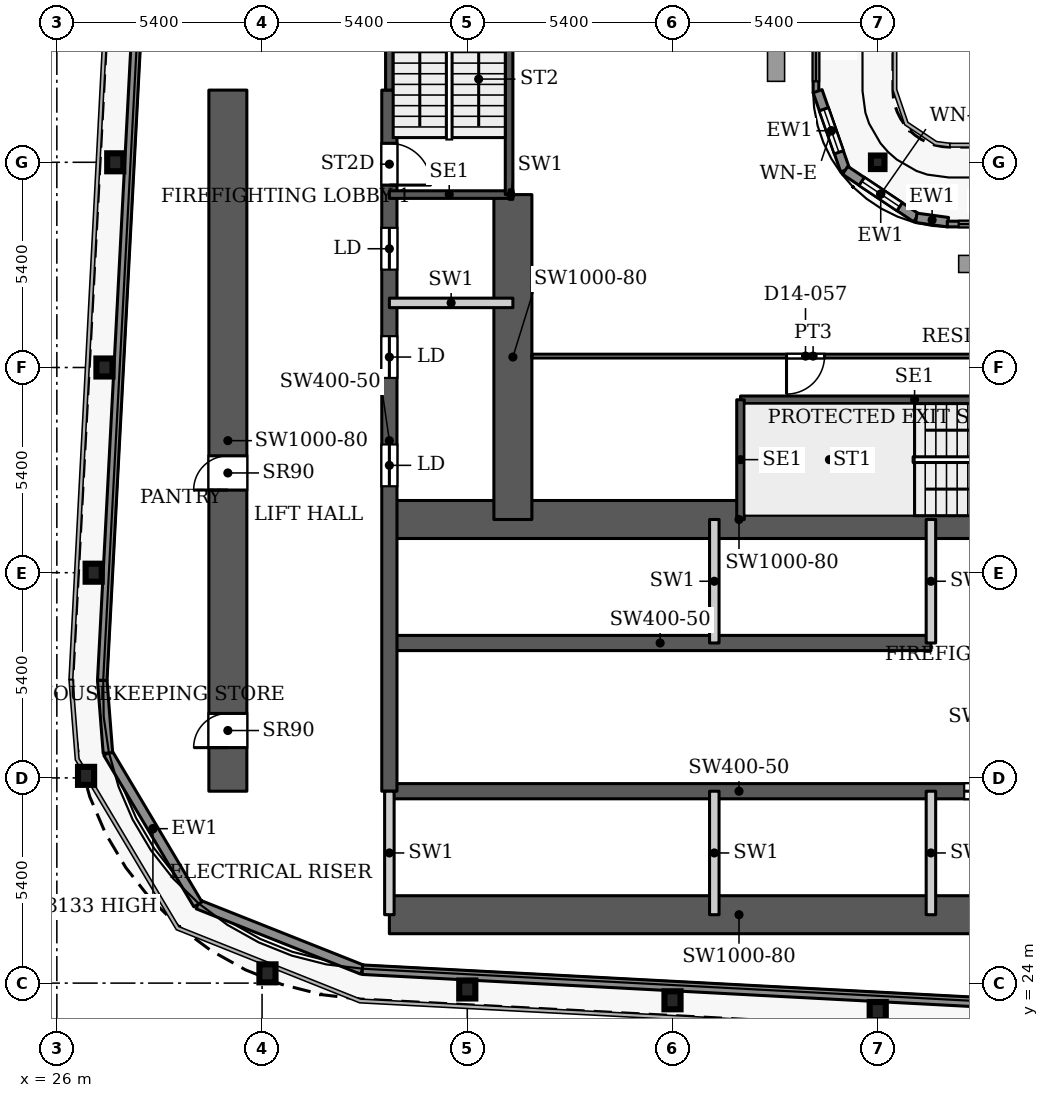
"""IFC4 building model, lengths in metres.
Left out: names, types, materials, properties, quantities, classifications, styles, units other than length and angle.
Written with IfcOpenShell. Run it as: python <this file> out.ifc"""

import sys

from ifc_helpers import new_model, si_unit, direction, frame, frame_2d, origin, origin_2d, place, context, subcontext, project, spatial, rectangle, hollow_rectangle, i_section, extrude, source, transform, mapped, element, fill, save


model = new_model("IFC4")
c1 = context("Model", 3, precision=1e-05, world=origin(), true_north=direction((0.0, 1.0)))
c2 = subcontext(c1, "Body", "Model", "MODEL_VIEW")
j1 = project(units=[si_unit("LENGTHUNIT", "METRE"), si_unit("PLANEANGLEUNIT", "RADIAN")], contexts=[c1])
p1 = place(None, origin())
s1 = spatial("IfcSite", under=j1, at=p1, CompositionType="ELEMENT")
p2 = place(p1, origin())
s2 = spatial("IfcBuilding", under=s1, at=p2, CompositionType="ELEMENT")
p3 = place(p2, frame((0.0, 0.0, 65.6)))
s3 = spatial("IfcBuildingStorey", under=s2, at=p3, CompositionType="ELEMENT", Elevation=65.6)
for number, where, z_axis, x_axis in (
    (1, (47.6, 23.264, 0.0), (0.0, 0.0, 1.0), (1.0, 0.0, 0.0)),
    (2, (42.2, 23.548, 0.0), (0.0, 0.0, 1.0), (1.0, 0.0, 0.0)),
    (3, (36.8, 23.832, 0.0), (0.0, 0.0, 1.0), (1.0, 0.0, 0.0)),
    (4, (31.542, 24.257, 0.0), (0.0, 0.0, 1.0), (1.0, 0.0, 0.0)),
    (5, (26.769, 29.454, 0.0), (0.0, 0.0, 1.0), (1.0, 0.0, 0.0)),
    (6, (26.969, 34.8, 0.0), (0.0, 0.0, 1.0), (1.0, 0.0, 0.0)),
    (7, (27.253, 40.2, 0.0), (0.0, 0.0, 1.0), (1.0, 0.0, 0.0)),
    (8, (27.537, 45.6, 0.0), (0.0, 0.0, 1.0), (1.0, 0.0, 0.0)),
):
    element("IfcColumn", number, at=place(p3, frame(where, z_axis=z_axis, x_axis=x_axis)), inside=s3, PredefinedType="COLUMN", context=c2, shape_type="SweptSolid", body=[
        extrude(i_section(OverallWidth=0.424, OverallDepth=0.474, WebThickness=0.048, FlangeThickness=0.077, FilletRadius=0.014, at=origin_2d()), origin(), (0.0, 0.0, 1.0), 3.9),
    ])
p4 = place(p3, frame((47.6, 45.6, 0.0), z_axis=(0.0, 0.0, 1.0), x_axis=(1.0, 0.0, 0.0)))
e9 = element("IfcColumn", 9, at=p4, inside=s3, PredefinedType="COLUMN", context=c2, shape_type="SweptSolid", body=[
    extrude(hollow_rectangle(XDim=0.356, YDim=0.356, WallThickness=0.016, InnerFilletRadius=0.016, OuterFilletRadius=0.032, at=origin_2d()), origin(), (0.0, 0.0, 1.0), 3.9),
])
p5 = place(p3, frame((34.75, 25.8, 0.0), z_axis=(0.0, 0.0, 1.0), x_axis=(1.0, 0.0, 0.0)))
e10 = element("IfcWall", 10, at=p5, inside=s3, PredefinedType="SHEAR", context=c2, shape_type="SweptSolid", body=[
    extrude(rectangle(XDim=18.4, YDim=1.0, at=frame_2d((9.2, 0.0))), origin(), (0.0, 0.0, 1.0), 3.9),
])
p6 = place(p3, frame((34.75, 29.05, 0.0), z_axis=(0.0, 0.0, 1.0), x_axis=(1.0, 0.0, 0.0)))
e11 = element("IfcWall", 11, at=p6, inside=s3, PredefinedType="SHEAR", context=c2, shape_type="SweptSolid", body=[
    extrude(rectangle(XDim=18.4, YDim=0.4, at=frame_2d((9.2, 0.0))), origin(), (0.0, 0.0, 1.0), 3.9),
])
p7 = place(p6, frame((15.125, 0.0, 0.0)))
e12 = element("IfcOpeningElement", 12, at=p7, cuts=e11, PredefinedType="OPENING", context=c2, shape_type="SweptSolid", body=[
    extrude(rectangle(XDim=1.1, YDim=2.2, at=frame_2d((0.55, 1.1))), frame((0.0, 0.21, 0.0), z_axis=(0.0, -1.0, 0.0), x_axis=(1.0, 0.0, 0.0)), (0.0, 0.0, 1.0), 0.42),
])
p8 = place(p3, frame((34.75, 32.95, 0.0), z_axis=(0.0, 0.0, 1.0), x_axis=(1.0, 0.0, 0.0)))
e13 = element("IfcWall", 13, at=p8, inside=s3, PredefinedType="SHEAR", context=c2, shape_type="SweptSolid", body=[
    extrude(rectangle(XDim=14.25, YDim=0.4, at=frame_2d((7.125, 0.0))), origin(), (0.0, 0.0, 1.0), 3.9),
])
p9 = place(p3, frame((34.75, 36.2, 0.0), z_axis=(0.0, 0.0, 1.0), x_axis=(1.0, 0.0, 0.0)))
e14 = element("IfcWall", 14, at=p9, inside=s3, PredefinedType="SHEAR", context=c2, shape_type="SweptSolid", body=[
    extrude(rectangle(XDim=18.4, YDim=1.0, at=frame_2d((9.2, 0.0))), origin(), (0.0, 0.0, 1.0), 3.9),
])
p10 = place(p9, frame((16.9, 0.0, 0.0)))
e15 = element("IfcOpeningElement", 15, at=p10, cuts=e14, PredefinedType="OPENING", context=c2, shape_type="SweptSolid", body=[
    extrude(rectangle(XDim=1.0, YDim=2.2, at=frame_2d((0.5, 1.1))), frame((0.0, 0.51, 0.0), z_axis=(0.0, -1.0, 0.0), x_axis=(1.0, 0.0, 0.0)), (0.0, 0.0, 1.0), 1.02),
])
p11 = place(p3, frame((34.75, 29.05, 0.0), z_axis=(0.0, 0.0, 1.0), x_axis=(0.0, 1.0, 0.0)))
e16 = element("IfcWall", 16, at=p11, inside=s3, PredefinedType="SHEAR", context=c2, shape_type="SweptSolid", body=[
    extrude(rectangle(XDim=18.45, YDim=0.4, at=frame_2d((9.225, 0.0))), origin(), (0.0, 0.0, 1.0), 3.9),
])
p12 = place(p11, frame((8.025, 0.0, 0.0)))
e17 = element("IfcOpeningElement", 17, at=p12, cuts=e16, PredefinedType="OPENING", context=c2, shape_type="SweptSolid", body=[
    extrude(rectangle(XDim=1.1, YDim=2.2, at=frame_2d((0.55, 1.1))), frame((0.0, 0.21, 0.0), z_axis=(0.0, -1.0, 0.0), x_axis=(1.0, 0.0, 0.0)), (0.0, 0.0, 1.0), 0.42),
])
p13 = place(p11, frame((10.875, 0.0, 0.0)))
e18 = element("IfcOpeningElement", 18, at=p13, cuts=e16, PredefinedType="OPENING", context=c2, shape_type="SweptSolid", body=[
    extrude(rectangle(XDim=1.1, YDim=2.2, at=frame_2d((0.55, 1.1))), frame((0.0, 0.21, 0.0), z_axis=(0.0, -1.0, 0.0), x_axis=(1.0, 0.0, 0.0)), (0.0, 0.0, 1.0), 0.42),
])
p14 = place(p11, frame((13.725, 0.0, 0.0)))
e19 = element("IfcOpeningElement", 19, at=p14, cuts=e16, PredefinedType="OPENING", context=c2, shape_type="SweptSolid", body=[
    extrude(rectangle(XDim=1.1, YDim=2.2, at=frame_2d((0.55, 1.1))), frame((0.0, 0.21, 0.0), z_axis=(0.0, -1.0, 0.0), x_axis=(1.0, 0.0, 0.0)), (0.0, 0.0, 1.0), 0.42),
])
p15 = place(p11, frame((15.95, 0.0, 0.0)))
e20 = element("IfcOpeningElement", 20, at=p15, cuts=e16, PredefinedType="OPENING", context=c2, shape_type="SweptSolid", body=[
    extrude(rectangle(XDim=1.1, YDim=2.2, at=frame_2d((0.55, 1.1))), frame((0.0, 0.21, 0.0), z_axis=(0.0, -1.0, 0.0), x_axis=(1.0, 0.0, 0.0)), (0.0, 0.0, 1.0), 0.42),
])
p16 = place(p3, frame((38.0, 36.2, 0.0), z_axis=(0.0, 0.0, 1.0), x_axis=(0.0, 1.0, 0.0)))
e21 = element("IfcWall", 21, at=p16, inside=s3, PredefinedType="SHEAR", context=c2, shape_type="SweptSolid", body=[
    extrude(rectangle(XDim=8.55, YDim=1.0, at=frame_2d((4.275, 0.0))), origin(), (0.0, 0.0, 1.0), 3.9),
])
p17 = place(p3, frame((30.5, 29.05, 0.0), z_axis=(0.0, 0.0, 1.0), x_axis=(0.0, 1.0, 0.0)))
e22 = element("IfcWall", 22, at=p17, inside=s3, PredefinedType="SHEAR", context=c2, shape_type="SweptSolid", body=[
    extrude(rectangle(XDim=18.45, YDim=1.0, at=frame_2d((9.225, 0.0))), origin(), (0.0, 0.0, 1.0), 3.9),
])
p18 = place(p17, frame((1.147, 0.0, 0.0)))
e23 = element("IfcOpeningElement", 23, at=p18, cuts=e22, PredefinedType="OPENING", context=c2, shape_type="SweptSolid", body=[
    extrude(rectangle(XDim=0.9, YDim=2.2, at=frame_2d((0.45, 1.1))), frame((0.0, 0.51, 0.0), z_axis=(0.0, -1.0, 0.0), x_axis=(1.0, 0.0, 0.0)), (0.0, 0.0, 1.0), 1.02),
])
p19 = place(p17, frame((7.925, 0.0, 0.0)))
e24 = element("IfcOpeningElement", 24, at=p19, cuts=e22, PredefinedType="OPENING", context=c2, shape_type="SweptSolid", body=[
    extrude(rectangle(XDim=0.9, YDim=2.2, at=frame_2d((0.45, 1.1))), frame((0.0, 0.51, 0.0), z_axis=(0.0, -1.0, 0.0), x_axis=(1.0, 0.0, 0.0)), (0.0, 0.0, 1.0), 1.02),
])
p20 = place(p3, frame((34.039, 24.353, 0.0), z_axis=(0.0, 0.0, 1.0), x_axis=(-0.929352825399, 0.369192803184, 0.0)))
e25 = element("IfcWall", 25, at=p20, inside=s3, PredefinedType="SOLIDWALL", context=c2, shape_type="SweptSolid", body=[
    extrude(rectangle(XDim=4.656, YDim=0.25, at=frame_2d((2.328, 0.0))), origin(), (0.0, 0.0, 1.0), 3.75),
])
p21 = place(p3, frame((29.712, 26.072, 0.0), z_axis=(0.0, 0.0, 1.0), x_axis=(-0.511028049012, 0.859564036662, 0.0)))
e26 = element("IfcWall", 26, at=p21, inside=s3, PredefinedType="SOLIDWALL", context=c2, shape_type="SweptSolid", body=[
    extrude(rectangle(XDim=4.634, YDim=0.25, at=frame_2d((2.317, 0.0))), origin(), (0.0, 0.0, 1.0), 3.133),
])
p22 = place(p3, frame((27.344, 30.055, 0.0), z_axis=(0.0, 0.0, 1.0), x_axis=(-0.077571675317, 0.99698677784, 0.0)))
e27 = element("IfcWall", 27, at=p22, inside=s3, PredefinedType="SOLIDWALL", context=c2, shape_type="SweptSolid", body=[
    extrude(rectangle(XDim=1.92, YDim=0.25, at=frame_2d((0.96, 0.0))), origin(), (0.0, 0.0, 1.0), 3.75),
])
p23 = place(p3, frame((27.195, 31.969, 0.0), z_axis=(0.0, 0.0, 1.0), x_axis=(0.052554995867, 0.998618031286, 0.0)))
e28 = element("IfcWall", 28, at=p23, inside=s3, PredefinedType="SOLIDWALL", context=c2, shape_type="SweptSolid", body=[
    extrude(rectangle(XDim=66.787, YDim=0.25, at=frame_2d((33.394, 0.0))), origin(), (0.0, 0.0, 1.0), 3.75),
])
p24 = place(p3, frame((45.975, 49.83, 0.0), z_axis=(0.0, 0.0, 1.0), x_axis=(0.0, -1.0, 0.0)))
e29 = element("IfcWall", 29, at=p24, inside=s3, PredefinedType="SOLIDWALL", context=c2, shape_type="SweptSolid", body=[
    extrude(rectangle(XDim=2.4, YDim=0.15, at=frame_2d((1.2, 0.0))), origin(), (0.0, 0.0, 1.0), 3.75),
])
p25 = place(p24, frame((0.3, 0.0, 0.0)))
e30 = element("IfcOpeningElement", 30, at=p25, cuts=e29, PredefinedType="OPENING", context=c2, shape_type="SweptSolid", body=[
    extrude(rectangle(XDim=1.8, YDim=2.4, at=frame_2d((0.9, 1.2))), frame((0.0, 0.085, 0.0), z_axis=(0.0, -1.0, 0.0), x_axis=(1.0, 0.0, 0.0)), (0.0, 0.0, 1.0), 0.17),
])
p26 = place(p3, frame((46.018, 47.471, 0.0), z_axis=(0.0, 0.0, 1.0), x_axis=(0.328791208903, -0.944402637093, 0.0)))
e31 = element("IfcWall", 31, at=p26, inside=s3, PredefinedType="SOLIDWALL", context=c2, shape_type="SweptSolid", body=[
    extrude(rectangle(XDim=2.205, YDim=0.25, at=frame_2d((1.102, 0.0))), origin(), (0.0, 0.0, 1.0), 3.75),
])
p27 = place(p26, frame((0.503, 0.0, 0.6)))
e32 = element("IfcOpeningElement", 32, at=p27, cuts=e31, PredefinedType="OPENING", context=c2, shape_type="SweptSolid", body=[
    extrude(rectangle(XDim=1.2, YDim=2.1, at=frame_2d((0.6, 1.05))), frame((0.0, 0.135, 0.0), z_axis=(0.0, -1.0, 0.0), x_axis=(1.0, 0.0, 0.0)), (0.0, 0.0, 1.0), 0.27),
])
p28 = place(p3, frame((46.743, 45.389, 0.0), z_axis=(0.0, 0.0, 1.0), x_axis=(0.831449265529, -0.555600682912, 0.0)))
e33 = element("IfcWall", 33, at=p28, inside=s3, PredefinedType="SOLIDWALL", context=c2, shape_type="SweptSolid", body=[
    extrude(rectangle(XDim=2.251, YDim=0.25, at=frame_2d((1.126, 0.0))), origin(), (0.0, 0.0, 1.0), 3.75),
])
p29 = place(p28, frame((0.525, 0.0, 0.6)))
e34 = element("IfcOpeningElement", 34, at=p29, cuts=e33, PredefinedType="OPENING", context=c2, shape_type="SweptSolid", body=[
    extrude(rectangle(XDim=1.2, YDim=2.1, at=frame_2d((0.6, 1.05))), frame((0.0, 0.135, 0.0), z_axis=(0.0, -1.0, 0.0), x_axis=(1.0, 0.0, 0.0)), (0.0, 0.0, 1.0), 0.27),
])
p30 = place(p3, frame((48.615, 44.138, 0.0), z_axis=(0.0, 0.0, 1.0), x_axis=(0.990741504246, -0.135761819977, 0.0)))
e35 = element("IfcWall", 35, at=p30, inside=s3, PredefinedType="SOLIDWALL", context=c2, shape_type="SweptSolid", body=[
    extrude(rectangle(XDim=0.84, YDim=0.25, at=frame_2d((0.42, 0.0))), origin(), (0.0, 0.0, 1.0), 3.75),
])
p31 = place(p3, frame((49.43, 43.975, 0.0), z_axis=(0.0, 0.0, 1.0), x_axis=(1.0, 0.0, 0.0)))
e36 = element("IfcWall", 36, at=p31, inside=s3, PredefinedType="SOLIDWALL", context=c2, shape_type="SweptSolid", body=[
    extrude(rectangle(XDim=2.4, YDim=0.15, at=frame_2d((1.2, 0.0))), origin(), (0.0, 0.0, 1.0), 3.75),
])
p32 = place(p31, frame((0.3, 0.0, 0.0)))
e37 = element("IfcOpeningElement", 37, at=p32, cuts=e36, PredefinedType="OPENING", context=c2, shape_type="SweptSolid", body=[
    extrude(rectangle(XDim=1.8, YDim=2.4, at=frame_2d((0.9, 1.2))), frame((0.0, 0.085, 0.0), z_axis=(0.0, -1.0, 0.0), x_axis=(1.0, 0.0, 0.0)), (0.0, 0.0, 1.0), 0.17),
])
p33 = place(p3, frame((100.586, 20.85, 0.0), z_axis=(0.0, 0.0, 1.0), x_axis=(-0.99861746497, 0.052565755559, 0.0)))
e38 = element("IfcWall", 38, at=p33, inside=s3, PredefinedType="SOLIDWALL", context=c2, shape_type="SweptSolid", body=[
    extrude(rectangle(XDim=66.639, YDim=0.25, at=frame_2d((33.319, 0.0))), origin(), (0.0, 0.0, 1.0), 3.75),
])
p34 = place(p3, frame((43.99, 39.35, 0.0), z_axis=(0.0, 0.0, 1.0), x_axis=(1.0, 0.0, 0.0)))
e39 = element("IfcWall", 39, at=p34, inside=s3, PredefinedType="SHEAR", context=c2, shape_type="SweptSolid", body=[
    extrude(rectangle(XDim=9.16, YDim=0.2, at=frame_2d((4.58, 0.0))), origin(), (0.0, 0.0, 1.0), 3.9),
])
p35 = place(p3, frame((43.99, 36.2, 0.0), z_axis=(0.0, 0.0, 1.0), x_axis=(0.0, 1.0, 0.0)))
e40 = element("IfcWall", 40, at=p35, inside=s3, PredefinedType="SHEAR", context=c2, shape_type="SweptSolid", body=[
    extrude(rectangle(XDim=3.15, YDim=0.2, at=frame_2d((1.575, 0.0))), origin(), (0.0, 0.0, 1.0), 3.9),
])
p36 = place(p3, frame((34.75, 44.75, 0.0), z_axis=(0.0, 0.0, 1.0), x_axis=(1.0, 0.0, 0.0)))
e41 = element("IfcWall", 41, at=p36, inside=s3, PredefinedType="SHEAR", context=c2, shape_type="SweptSolid", body=[
    extrude(rectangle(XDim=3.15, YDim=0.2, at=frame_2d((1.575, 0.0))), origin(), (0.0, 0.0, 1.0), 3.9),
])
p37 = place(p3, frame((34.75, 47.5, 0.0), z_axis=(0.0, 0.0, 1.0), x_axis=(0.0, 1.0, 0.0)))
e42 = element("IfcWall", 42, at=p37, inside=s3, PredefinedType="SHEAR", context=c2, shape_type="SweptSolid", body=[
    extrude(rectangle(XDim=6.41, YDim=0.2, at=frame_2d((3.205, 0.0))), origin(), (0.0, 0.0, 1.0), 3.9),
])
p38 = place(p3, frame((37.9, 44.75, 0.0), z_axis=(0.0, 0.0, 1.0), x_axis=(0.0, 1.0, 0.0)))
e43 = element("IfcWall", 43, at=p38, inside=s3, PredefinedType="SHEAR", context=c2, shape_type="SweptSolid", body=[
    extrude(rectangle(XDim=9.16, YDim=0.2, at=frame_2d((4.58, 0.0))), origin(), (0.0, 0.0, 1.0), 3.9),
])
for number, where, z_axis, x_axis in (
    (44, (34.75, 25.8, 0.0), (0.0, 0.0, 1.0), (0.0, 1.0, 0.0)),
    (45, (43.3, 25.8, 0.0), (0.0, 0.0, 1.0), (0.0, 1.0, 0.0)),
    (46, (43.3, 32.95, 0.0), (0.0, 0.0, 1.0), (0.0, 1.0, 0.0)),
    (47, (49.0, 25.8, 0.0), (0.0, 0.0, 1.0), (0.0, 1.0, 0.0)),
    (48, (49.0, 32.95, 0.0), (0.0, 0.0, 1.0), (0.0, 1.0, 0.0)),
    (49, (34.75, 41.9, 0.0), (0.0, 0.0, 1.0), (1.0, 0.0, 0.0)),
):
    element("IfcWall", number, at=place(p3, frame(where, z_axis=z_axis, x_axis=x_axis)), inside=s3, PredefinedType="PARTITIONING", context=c2, shape_type="SweptSolid", body=[
        extrude(rectangle(XDim=3.25, YDim=0.25, at=frame_2d((1.625, 0.0))), origin(), (0.0, 0.0, 1.0), 3.9),
    ])
p39 = place(p3, frame((37.9, 44.75, 0.0), z_axis=(0.0, 0.0, 1.0), x_axis=(1.0, 0.0, 0.0)))
e50 = element("IfcWall", 50, at=p39, inside=s3, PredefinedType="PARTITIONING", context=c2, shape_type="SweptSolid", body=[
    extrude(rectangle(XDim=0.1, YDim=0.25, at=frame_2d((0.05, 0.0))), origin(), (0.0, 0.0, 1.0), 3.9),
])
p40 = place(p3, frame((38.499, 40.5, 0.0), z_axis=(0.0, 0.0, 1.0), x_axis=(1.0, 0.0, 0.0)))
e51 = element("IfcWall", 51, at=p40, inside=s3, PredefinedType="PARTITIONING", context=c2, shape_type="SweptSolid", body=[
    extrude(rectangle(XDim=14.801, YDim=0.1, at=frame_2d((7.4, 0.0))), origin(), (0.0, 0.0, 1.0), 3.6),
])
p41 = place(p40, frame((6.701, 0.0, 0.0)))
e52 = element("IfcOpeningElement", 52, at=p41, cuts=e51, PredefinedType="OPENING", context=c2, shape_type="SweptSolid", body=[
    extrude(rectangle(XDim=1.0, YDim=2.1, at=frame_2d((0.5, 1.05))), frame((0.0, 0.06, 0.0), z_axis=(0.0, -1.0, 0.0), x_axis=(1.0, 0.0, 0.0)), (0.0, 0.0, 1.0), 0.12),
])
m1 = source(origin(), c2, "Body", "SweptSolid", [
    extrude(rectangle(XDim=1.8, YDim=2.4, at=frame_2d((0.9, 1.2))), frame((0.0, 0.025, 0.0), z_axis=(0.0, -1.0, 0.0), x_axis=(1.0, 0.0, 0.0)), (0.0, 0.0, 1.0), 0.05),
])
p42 = place(p25, origin())
e53 = element("IfcDoor", 53, at=p42, inside=s3, OperationType="SLIDING_TO_LEFT", PredefinedType="DOOR", context=c2, shape_type="MappedRepresentation", body=[
    mapped(m1, transform((0.0, 0.0, 0.0), x_axis=(1.0, 0.0, 0.0), y_axis=(0.0, 1.0, 0.0), z_axis=(0.0, 0.0, 1.0), scale=1.0)),
])
fill(e30, e53)
m2 = source(origin(), c2, "Body", "SweptSolid", [
    extrude(rectangle(XDim=1.2, YDim=2.1, at=frame_2d((0.6, 1.05))), frame((0.0, 0.03, 0.0), z_axis=(0.0, -1.0, 0.0), x_axis=(1.0, 0.0, 0.0)), (0.0, 0.0, 1.0), 0.06),
])
p43 = place(p27, origin())
e54 = element("IfcWindow", 54, at=p43, inside=s3, PartitioningType="SINGLE_PANEL", PredefinedType="WINDOW", context=c2, shape_type="MappedRepresentation", body=[
    mapped(m2, transform((0.0, 0.0, 0.0), x_axis=(1.0, 0.0, 0.0), y_axis=(0.0, 1.0, 0.0), z_axis=(0.0, 0.0, 1.0), scale=1.0)),
])
fill(e32, e54)
p44 = place(p29, origin())
e55 = element("IfcWindow", 55, at=p44, inside=s3, PartitioningType="SINGLE_PANEL", PredefinedType="WINDOW", context=c2, shape_type="MappedRepresentation", body=[
    mapped(m2, transform((0.0, 0.0, 0.0), x_axis=(1.0, 0.0, 0.0), y_axis=(0.0, 1.0, 0.0), z_axis=(0.0, 0.0, 1.0), scale=1.0)),
])
fill(e34, e55)
p45 = place(p32, origin())
e56 = element("IfcDoor", 56, at=p45, inside=s3, OperationType="SLIDING_TO_LEFT", PredefinedType="DOOR", context=c2, shape_type="MappedRepresentation", body=[
    mapped(m1, transform((0.0, 0.0, 0.0), x_axis=(1.0, 0.0, 0.0), y_axis=(0.0, 1.0, 0.0), z_axis=(0.0, 0.0, 1.0), scale=1.0)),
])
fill(e37, e56)
m3 = source(origin(), c2, "Body", "SweptSolid", [
    extrude(rectangle(XDim=1.1, YDim=2.2, at=frame_2d((0.55, 1.1))), frame((0.0, 0.025, 0.0), z_axis=(0.0, -1.0, 0.0), x_axis=(1.0, 0.0, 0.0)), (0.0, 0.0, 1.0), 0.05),
])
p46 = place(p12, origin())
e57 = element("IfcDoor", 57, at=p46, inside=s3, OperationType="SLIDING_TO_LEFT", PredefinedType="DOOR", context=c2, shape_type="MappedRepresentation", body=[
    mapped(m3, transform((0.0, 0.0, 0.0), x_axis=(1.0, 0.0, 0.0), y_axis=(0.0, 1.0, 0.0), z_axis=(0.0, 0.0, 1.0), scale=1.0)),
])
fill(e17, e57)
p47 = place(p13, origin())
e58 = element("IfcDoor", 58, at=p47, inside=s3, OperationType="SLIDING_TO_LEFT", PredefinedType="DOOR", context=c2, shape_type="MappedRepresentation", body=[
    mapped(m3, transform((0.0, 0.0, 0.0), x_axis=(1.0, 0.0, 0.0), y_axis=(0.0, 1.0, 0.0), z_axis=(0.0, 0.0, 1.0), scale=1.0)),
])
fill(e18, e58)
p48 = place(p14, origin())
e59 = element("IfcDoor", 59, at=p48, inside=s3, OperationType="SLIDING_TO_LEFT", PredefinedType="DOOR", context=c2, shape_type="MappedRepresentation", body=[
    mapped(m3, transform((0.0, 0.0, 0.0), x_axis=(1.0, 0.0, 0.0), y_axis=(0.0, 1.0, 0.0), z_axis=(0.0, 0.0, 1.0), scale=1.0)),
])
fill(e19, e59)
p49 = place(p7, origin())
e60 = element("IfcDoor", 60, at=p49, inside=s3, OperationType="SLIDING_TO_LEFT", PredefinedType="DOOR", context=c2, shape_type="MappedRepresentation", body=[
    mapped(m3, transform((0.0, 0.0, 0.0), x_axis=(1.0, 0.0, 0.0), y_axis=(0.0, 1.0, 0.0), z_axis=(0.0, 0.0, 1.0), scale=1.0)),
])
fill(e12, e60)
m4 = source(origin(), c2, "Body", "SweptSolid", [
    extrude(rectangle(XDim=0.9, YDim=2.2, at=frame_2d((0.45, 1.1))), frame((0.0, 0.025, 0.0), z_axis=(0.0, -1.0, 0.0), x_axis=(1.0, 0.0, 0.0)), (0.0, 0.0, 1.0), 0.05),
])
p50 = place(p18, origin())
e61 = element("IfcDoor", 61, at=p50, inside=s3, OperationType="SINGLE_SWING_LEFT", PredefinedType="DOOR", context=c2, shape_type="MappedRepresentation", body=[
    mapped(m4, transform((0.0, 0.0, 0.0), x_axis=(1.0, 0.0, 0.0), y_axis=(0.0, 1.0, 0.0), z_axis=(0.0, 0.0, 1.0), scale=1.0)),
])
fill(e23, e61)
p51 = place(p19, origin())
e62 = element("IfcDoor", 62, at=p51, inside=s3, OperationType="SINGLE_SWING_LEFT", PredefinedType="DOOR", context=c2, shape_type="MappedRepresentation", body=[
    mapped(m4, transform((0.0, 0.0, 0.0), x_axis=(1.0, 0.0, 0.0), y_axis=(0.0, 1.0, 0.0), z_axis=(0.0, 0.0, 1.0), scale=1.0)),
])
fill(e24, e62)
m5 = source(origin(), c2, "Body", "SweptSolid", [
    extrude(rectangle(XDim=1.1, YDim=2.2, at=frame_2d((0.55, 1.1))), frame((0.0, 0.025, 0.0), z_axis=(0.0, -1.0, 0.0), x_axis=(1.0, 0.0, 0.0)), (0.0, 0.0, 1.0), 0.05),
])
p52 = place(p15, origin())
e63 = element("IfcDoor", 63, at=p52, inside=s3, OperationType="SINGLE_SWING_RIGHT", PredefinedType="DOOR", context=c2, shape_type="MappedRepresentation", body=[
    mapped(m5, transform((0.0, 0.0, 0.0), x_axis=(1.0, 0.0, 0.0), y_axis=(0.0, 1.0, 0.0), z_axis=(0.0, 0.0, 1.0), scale=1.0)),
])
fill(e20, e63)
m6 = source(origin(), c2, "Body", "SweptSolid", [
    extrude(rectangle(XDim=1.0, YDim=2.1, at=frame_2d((0.5, 1.05))), frame((0.0, 0.025, 0.0), z_axis=(0.0, -1.0, 0.0), x_axis=(1.0, 0.0, 0.0)), (0.0, 0.0, 1.0), 0.05),
])
p53 = place(p41, origin())
e64 = element("IfcDoor", 64, at=p53, inside=s3, OperationType="SINGLE_SWING_RIGHT", PredefinedType="DOOR", context=c2, shape_type="MappedRepresentation", body=[
    mapped(m6, transform((0.0, 0.0, 0.0), x_axis=(1.0, 0.0, 0.0), y_axis=(0.0, 1.0, 0.0), z_axis=(0.0, 0.0, 1.0), scale=1.0)),
])
fill(e52, e64)
save(model, sys.argv[1])
